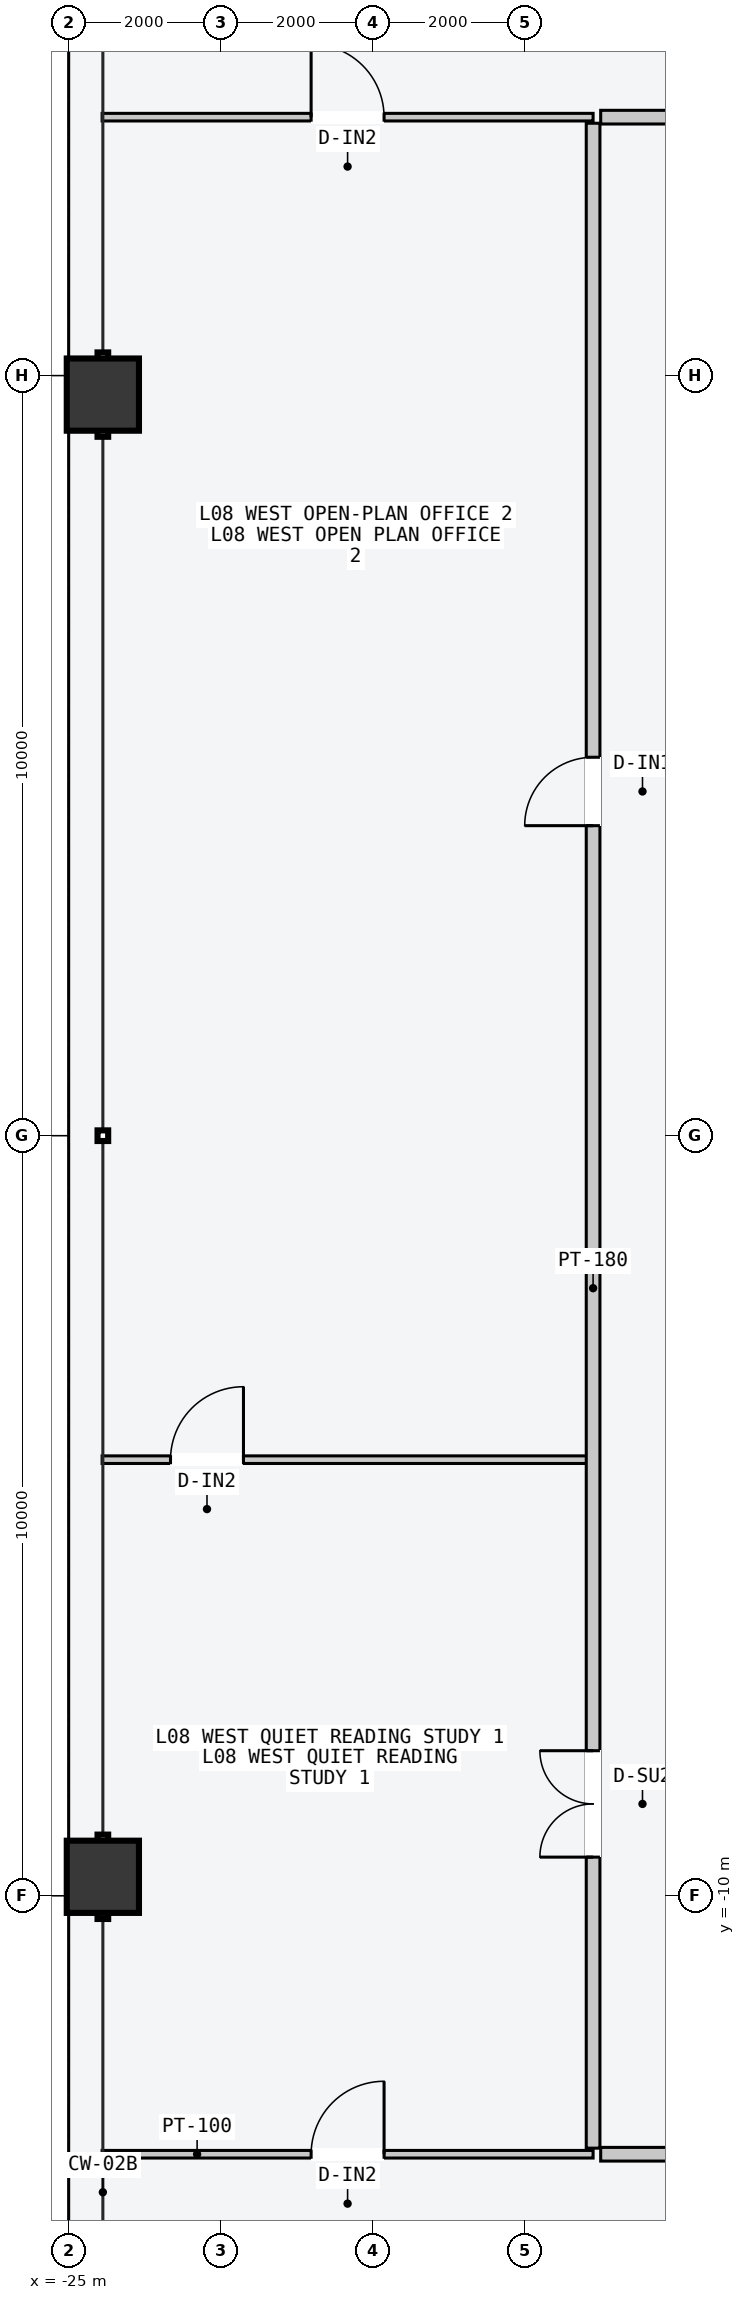
"""IFC4 building model, lengths in metres.
Left out: names, types, materials, properties, quantities, classifications, styles, units other than length and angle.
Written with IfcOpenShell. Run it as: python <this file> out.ifc"""

import sys

from ifc_helpers import new_model, si_unit, direction, frame, frame_2d, origin, origin_2d, place, context, subcontext, project, spatial, rectangle, hollow_rectangle, extrude, element, fill, save


model = new_model("IFC4")
c1 = context("Model", 3, precision=1e-05, world=origin(), true_north=direction((0.0, 1.0)))
c2 = subcontext(c1, "Body", "Model", "MODEL_VIEW")
j1 = project(units=[si_unit("LENGTHUNIT", "METRE"), si_unit("PLANEANGLEUNIT", "RADIAN")], contexts=[c1])
p1 = place(None, origin())
s1 = spatial("IfcSite", under=j1, at=p1, CompositionType="ELEMENT")
p2 = place(p1, origin())
s2 = spatial("IfcBuilding", under=s1, at=p2, CompositionType="ELEMENT")
p3 = place(p2, frame((0.0, 0.0, 34.8)))
s3 = spatial("IfcBuildingStorey", under=s2, at=p3, CompositionType="ELEMENT", Elevation=34.8)
for number, where, z_axis, x_axis in (
    (1, (-24.55, -9.75, 0.0), (0.0, 0.0, 1.0), (0.0, 1.0, 0.0)),
    (2, (-24.55, 9.75, 0.0), (0.0, 0.0, 1.0), (0.0, 1.0, 0.0)),
):
    element("IfcColumn", number, at=place(p3, frame(where, z_axis=z_axis, x_axis=x_axis)), inside=s3, PredefinedType="COLUMN", context=c2, shape_type="SweptSolid", body=[
        extrude(hollow_rectangle(XDim=0.95, YDim=0.95, WallThickness=0.048, at=origin_2d()), origin(), (0.0, 0.0, 1.0), 3.6),
    ])
p4 = place(p3, frame((-18.0, 13.4, 0.0), z_axis=(0.0, 0.0, 1.0), x_axis=(1.0, 0.0, 0.0)))
e3 = element("IfcWall", 3, at=p4, inside=s3, PredefinedType="PARTITIONING", context=c2, shape_type="SweptSolid", body=[
    extrude(rectangle(XDim=36.0, YDim=0.18, at=frame_2d((18.0, 0.0))), origin(), (0.0, 0.0, 1.0), 3.4),
])
p5 = place(p4, frame((7.185, 0.0, 0.0)))
e4 = element("IfcOpeningElement", 4, at=p5, cuts=e3, PredefinedType="OPENING", context=c2, shape_type="SweptSolid", body=[
    extrude(rectangle(XDim=1.24, YDim=2.24, at=frame_2d((0.62, 1.12))), frame((0.0, 0.1, 0.0), z_axis=(0.0, -1.0, 0.0), x_axis=(1.0, 0.0, 0.0)), (0.0, 0.0, 1.0), 0.2),
])
p6 = place(p4, frame((21.083, 0.0, 0.0)))
e5 = element("IfcOpeningElement", 5, at=p6, cuts=e3, PredefinedType="OPENING", context=c2, shape_type="SweptSolid", body=[
    extrude(rectangle(XDim=1.4, YDim=2.2, at=frame_2d((0.7, 1.1))), frame((0.0, 0.1, 0.0), z_axis=(0.0, -1.0, 0.0), x_axis=(1.0, 0.0, 0.0)), (0.0, 0.0, 1.0), 0.2),
])
p7 = place(p4, frame((31.528, 0.0, 0.0)))
e6 = element("IfcOpeningElement", 6, at=p7, cuts=e3, PredefinedType="OPENING", context=c2, shape_type="SweptSolid", body=[
    extrude(rectangle(XDim=0.9, YDim=2.15, at=frame_2d((0.45, 1.075))), frame((0.0, 0.1, 0.0), z_axis=(0.0, -1.0, 0.0), x_axis=(1.0, 0.0, 0.0)), (0.0, 0.0, 1.0), 0.2),
])
p8 = place(p3, frame((-24.56, 13.4, 0.0), z_axis=(0.0, 0.0, 1.0), x_axis=(1.0, 0.0, 0.0)))
e7 = element("IfcWall", 7, at=p8, inside=s3, PredefinedType="PARTITIONING", context=c2, shape_type="SweptSolid", body=[
    extrude(rectangle(XDim=6.46, YDim=0.1, at=frame_2d((3.23, 0.0))), origin(), (0.0, 0.0, 1.0), 3.4),
])
p9 = place(p8, frame((2.75, 0.0, 0.0)))
e8 = element("IfcOpeningElement", 8, at=p9, cuts=e7, PredefinedType="OPENING", context=c2, shape_type="SweptSolid", body=[
    extrude(rectangle(XDim=0.96, YDim=2.18, at=frame_2d((0.48, 1.09))), frame((0.0, 0.06, 0.0), z_axis=(0.0, -1.0, 0.0), x_axis=(1.0, 0.0, 0.0)), (0.0, 0.0, 1.0), 0.12),
])
p10 = place(p3, frame((-18.0, -13.4, 0.0), z_axis=(0.0, 0.0, 1.0), x_axis=(1.0, 0.0, 0.0)))
e9 = element("IfcWall", 9, at=p10, inside=s3, PredefinedType="PARTITIONING", context=c2, shape_type="SweptSolid", body=[
    extrude(rectangle(XDim=36.0, YDim=0.18, at=frame_2d((18.0, 0.0))), origin(), (0.0, 0.0, 1.0), 3.4),
])
p11 = place(p10, frame((7.255, 0.0, 0.0)))
e10 = element("IfcOpeningElement", 10, at=p11, cuts=e9, PredefinedType="OPENING", context=c2, shape_type="SweptSolid", body=[
    extrude(rectangle(XDim=0.96, YDim=2.18, at=frame_2d((0.48, 1.09))), frame((0.0, 0.1, 0.0), z_axis=(0.0, -1.0, 0.0), x_axis=(1.0, 0.0, 0.0)), (0.0, 0.0, 1.0), 0.2),
])
p12 = place(p10, frame((25.225, 0.0, 0.0)))
e11 = element("IfcOpeningElement", 11, at=p12, cuts=e9, PredefinedType="OPENING", context=c2, shape_type="SweptSolid", body=[
    extrude(rectangle(XDim=1.02, YDim=2.2, at=frame_2d((0.51, 1.1))), frame((0.0, 0.1, 0.0), z_axis=(0.0, -1.0, 0.0), x_axis=(1.0, 0.0, 0.0)), (0.0, 0.0, 1.0), 0.2),
])
p13 = place(p3, frame((-24.56, -13.4, 0.0), z_axis=(0.0, 0.0, 1.0), x_axis=(1.0, 0.0, 0.0)))
e12 = element("IfcWall", 12, at=p13, inside=s3, PredefinedType="PARTITIONING", context=c2, shape_type="SweptSolid", body=[
    extrude(rectangle(XDim=6.46, YDim=0.1, at=frame_2d((3.23, 0.0))), origin(), (0.0, 0.0, 1.0), 3.4),
])
p14 = place(p13, frame((2.75, 0.0, 0.0)))
e13 = element("IfcOpeningElement", 13, at=p14, cuts=e12, PredefinedType="OPENING", context=c2, shape_type="SweptSolid", body=[
    extrude(rectangle(XDim=0.96, YDim=2.18, at=frame_2d((0.48, 1.09))), frame((0.0, 0.06, 0.0), z_axis=(0.0, -1.0, 0.0), x_axis=(1.0, 0.0, 0.0)), (0.0, 0.0, 1.0), 0.12),
])
p15 = place(p3, frame((-24.56, -4.262, 0.0), z_axis=(0.0, 0.0, 1.0), x_axis=(1.0, 0.0, 0.0)))
e14 = element("IfcWall", 14, at=p15, inside=s3, PredefinedType="PARTITIONING", context=c2, shape_type="SweptSolid", body=[
    extrude(rectangle(XDim=6.4, YDim=0.1, at=frame_2d((3.2, 0.0))), origin(), (0.0, 0.0, 1.0), 3.4),
])
p16 = place(p15, frame((0.9, 0.0, 0.0)))
e15 = element("IfcOpeningElement", 15, at=p16, cuts=e14, PredefinedType="OPENING", context=c2, shape_type="SweptSolid", body=[
    extrude(rectangle(XDim=0.96, YDim=2.18, at=frame_2d((0.48, 1.09))), frame((0.0, 0.06, 0.0), z_axis=(0.0, -1.0, 0.0), x_axis=(1.0, 0.0, 0.0)), (0.0, 0.0, 1.0), 0.12),
])
p17 = place(p3, frame((-18.1, -13.32, 0.0), z_axis=(0.0, 0.0, 1.0), x_axis=(0.0, 1.0, 0.0)))
e16 = element("IfcWall", 16, at=p17, inside=s3, PredefinedType="PARTITIONING", context=c2, shape_type="SweptSolid", body=[
    extrude(rectangle(XDim=26.64, YDim=0.18, at=frame_2d((13.32, 0.0))), origin(), (0.0, 0.0, 1.0), 3.4),
])
p18 = place(p17, frame((3.829, 0.0, 0.0)))
e17 = element("IfcOpeningElement", 17, at=p18, cuts=e16, PredefinedType="OPENING", context=c2, shape_type="SweptSolid", body=[
    extrude(rectangle(XDim=1.4, YDim=2.2, at=frame_2d((0.7, 1.1))), frame((0.0, 0.1, 0.0), z_axis=(0.0, -1.0, 0.0), x_axis=(1.0, 0.0, 0.0)), (0.0, 0.0, 1.0), 0.2),
])
p19 = place(p17, frame((17.399, 0.0, 0.0)))
e18 = element("IfcOpeningElement", 18, at=p19, cuts=e16, PredefinedType="OPENING", context=c2, shape_type="SweptSolid", body=[
    extrude(rectangle(XDim=0.9, YDim=2.15, at=frame_2d((0.45, 1.075))), frame((0.0, 0.1, 0.0), z_axis=(0.0, -1.0, 0.0), x_axis=(1.0, 0.0, 0.0)), (0.0, 0.0, 1.0), 0.2),
])
p20 = place(p9, origin())
e19 = element("IfcDoor", 19, at=p20, inside=s3, OperationType="SINGLE_SWING_LEFT", PredefinedType="DOOR", context=c2, shape_type="SweptSolid", body=[
    extrude(rectangle(XDim=0.96, YDim=2.18, at=frame_2d((0.48, 1.09))), frame((0.0, 0.025, 0.0), z_axis=(0.0, -1.0, 0.0), x_axis=(1.0, 0.0, 0.0)), (0.0, 0.0, 1.0), 0.05),
])
fill(e8, e19)
p21 = place(p14, origin())
e20 = element("IfcDoor", 20, at=p21, inside=s3, OperationType="SINGLE_SWING_RIGHT", PredefinedType="DOOR", context=c2, shape_type="SweptSolid", body=[
    extrude(rectangle(XDim=0.96, YDim=2.18, at=frame_2d((0.48, 1.09))), frame((0.0, 0.025, 0.0), z_axis=(0.0, -1.0, 0.0), x_axis=(1.0, 0.0, 0.0)), (0.0, 0.0, 1.0), 0.05),
])
fill(e13, e20)
p22 = place(p16, origin())
e21 = element("IfcDoor", 21, at=p22, inside=s3, OperationType="SINGLE_SWING_RIGHT", PredefinedType="DOOR", context=c2, shape_type="SweptSolid", body=[
    extrude(rectangle(XDim=0.96, YDim=2.18, at=frame_2d((0.48, 1.09))), frame((0.0, 0.025, 0.0), z_axis=(0.0, -1.0, 0.0), x_axis=(1.0, 0.0, 0.0)), (0.0, 0.0, 1.0), 0.05),
])
fill(e15, e21)
p23 = place(p18, origin())
e22 = element("IfcDoor", 22, at=p23, inside=s3, OperationType="DOUBLE_DOOR_SINGLE_SWING", PredefinedType="DOOR", context=c2, shape_type="SweptSolid", body=[
    extrude(rectangle(XDim=1.4, YDim=2.2, at=frame_2d((0.7, 1.1))), frame((0.0, 0.025, 0.0), z_axis=(0.0, -1.0, 0.0), x_axis=(1.0, 0.0, 0.0)), (0.0, 0.0, 1.0), 0.05),
])
fill(e17, e22)
p24 = place(p19, origin())
e23 = element("IfcDoor", 23, at=p24, inside=s3, OperationType="SINGLE_SWING_LEFT", PredefinedType="DOOR", context=c2, shape_type="SweptSolid", body=[
    extrude(rectangle(XDim=0.9, YDim=2.15, at=frame_2d((0.45, 1.075))), frame((0.0, 0.025, 0.0), z_axis=(0.0, -1.0, 0.0), x_axis=(1.0, 0.0, 0.0)), (0.0, 0.0, 1.0), 0.05),
])
fill(e18, e23)
save(model, sys.argv[1])
